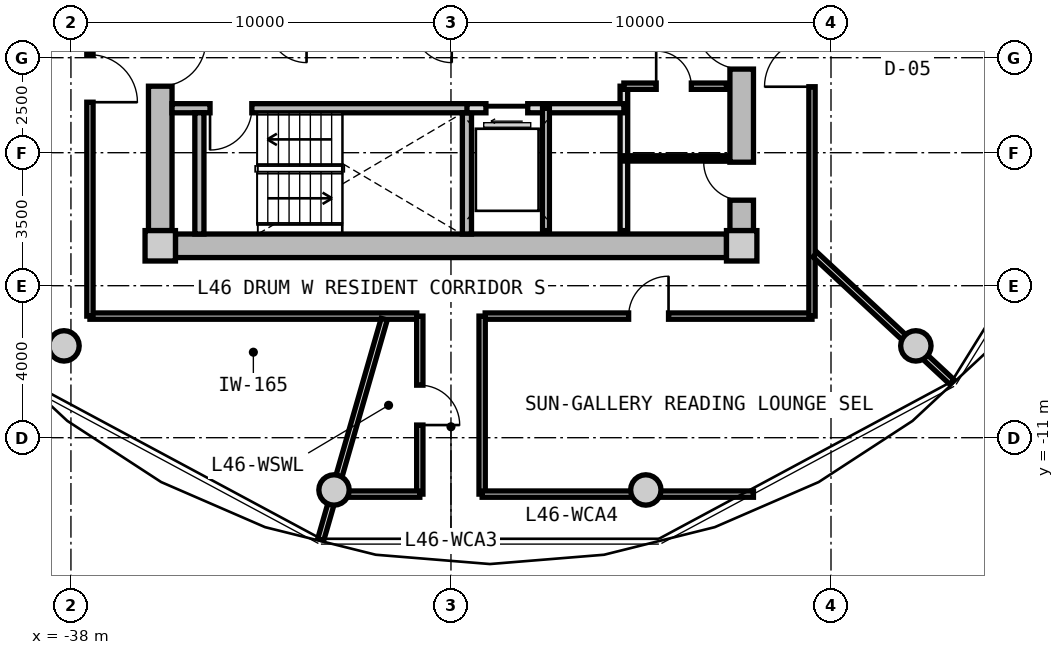
"""IFC4 building model, lengths in metres.
Left out: names, types, materials, properties, quantities, classifications, styles, units other than length and angle.
Written with IfcOpenShell. Run it as: python <this file> out.ifc"""

import sys

from ifc_helpers import new_model, si_unit, direction, frame, frame_2d, origin, origin_2d, place, context, subcontext, project, spatial, rectangle, circle, extrude, source, transform, mapped, element, fill, save


model = new_model("IFC4")
c1 = context("Model", 3, precision=1e-05, world=origin(), true_north=direction((0.0, 1.0)))
c2 = subcontext(c1, "Body", "Model", "MODEL_VIEW")
j1 = project(units=[si_unit("LENGTHUNIT", "METRE"), si_unit("PLANEANGLEUNIT", "RADIAN")], contexts=[c1])
p1 = place(None, origin())
s1 = spatial("IfcSite", under=j1, at=p1, CompositionType="ELEMENT")
p2 = place(p1, origin())
s2 = spatial("IfcBuilding", under=s1, at=p2, CompositionType="ELEMENT")
p3 = place(p2, frame((0.0, 0.0, 149.55)))
s3 = spatial("IfcBuildingStorey", under=s2, at=p3, CompositionType="ELEMENT", Elevation=149.55)
m1 = source(origin(), c2, "Body", "SweptSolid", [
    extrude(rectangle(XDim=0.8, YDim=0.8, at=origin_2d()), origin(), (0.0, 0.0, 1.0), 3.05),
])
for number, where, z_axis, x_axis in (
    (1, (-35.65, -5.95, 0.0), (0.0, 0.0, 1.0), (1.0, 0.0, 0.0)),
    (2, (-20.35, -5.95, 0.0), (0.0, 0.0, 1.0), (1.0, 0.0, 0.0)),
):
    element("IfcColumn", number, at=place(p3, frame(where, z_axis=z_axis, x_axis=x_axis)), inside=s3, PredefinedType="COLUMN", context=c2, shape_type="MappedRepresentation", body=[
        mapped(m1, transform((0.0, 0.0, 0.0), x_axis=(1.0, 0.0, 0.0), y_axis=(0.0, 1.0, 0.0), z_axis=(0.0, 0.0, 1.0), scale=1.0)),
    ])
m2 = source(origin(), c2, "Body", "SweptSolid", [
    extrude(rectangle(XDim=14.5, YDim=0.62, at=frame_2d((7.25, 0.0))), origin(), (0.0, 0.0, 1.0), 2.81),
])
p4 = place(p3, frame((-20.75, -5.95, 0.0), z_axis=(0.0, 0.0, 1.0), x_axis=(-1.0, 0.0, 0.0)))
e3 = element("IfcWall", 3, at=p4, inside=s3, PredefinedType="SHEAR", context=c2, shape_type="MappedRepresentation", body=[
    mapped(m2, transform((0.0, 0.0, 0.0), x_axis=(1.0, 0.0, 0.0), y_axis=(0.0, 1.0, 0.0), z_axis=(0.0, 0.0, 1.0), scale=1.0)),
])
m3 = source(origin(), c2, "Body", "SweptSolid", [
    extrude(rectangle(XDim=11.1, YDim=0.62, at=frame_2d((5.55, 0.0))), origin(), (0.0, 0.0, 1.0), 2.81),
])
p5 = place(p3, frame((-35.65, -5.55, 0.0), z_axis=(0.0, 0.0, 1.0), x_axis=(0.0, 1.0, 0.0)))
e4 = element("IfcWall", 4, at=p5, inside=s3, PredefinedType="SHEAR", context=c2, shape_type="MappedRepresentation", body=[
    mapped(m3, transform((0.0, 0.0, 0.0), x_axis=(1.0, 0.0, 0.0), y_axis=(0.0, 1.0, 0.0), z_axis=(0.0, 0.0, 1.0), scale=1.0)),
])
p6 = place(p5, frame((3.8, 0.0, 0.0)))
e5 = element("IfcOpeningElement", 5, at=p6, cuts=e4, PredefinedType="OPENING", context=c2, shape_type="SweptSolid", body=[
    extrude(rectangle(XDim=1.2, YDim=2.15, at=frame_2d((0.6, 1.075))), frame((0.0, 0.32, 0.0), z_axis=(0.0, -1.0, 0.0), x_axis=(1.0, 0.0, 0.0)), (0.0, 0.0, 1.0), 0.64),
])
p7 = place(p3, frame((-20.35, 5.55, 0.0), z_axis=(0.0, 0.0, 1.0), x_axis=(0.0, -1.0, 0.0)))
e6 = element("IfcWall", 6, at=p7, inside=s3, PredefinedType="SHEAR", context=c2, shape_type="MappedRepresentation", body=[
    mapped(m3, transform((0.0, 0.0, 0.0), x_axis=(1.0, 0.0, 0.0), y_axis=(0.0, 1.0, 0.0), z_axis=(0.0, 0.0, 1.0), scale=1.0)),
])
p8 = place(p7, frame((5.65, 0.0, 0.0)))
e7 = element("IfcOpeningElement", 7, at=p8, cuts=e6, PredefinedType="OPENING", context=c2, shape_type="SweptSolid", body=[
    extrude(rectangle(XDim=1.2, YDim=2.15, at=frame_2d((0.6, 1.075))), frame((0.0, 0.32, 0.0), z_axis=(0.0, -1.0, 0.0), x_axis=(1.0, 0.0, 0.0)), (0.0, 0.0, 1.0), 0.64),
])
p9 = place(p7, frame((9.3, 0.0, 0.0)))
e8 = element("IfcOpeningElement", 8, at=p9, cuts=e6, PredefinedType="OPENING", context=c2, shape_type="SweptSolid", body=[
    extrude(rectangle(XDim=1.0, YDim=2.1, at=frame_2d((0.5, 1.05))), frame((0.0, 0.32, 0.0), z_axis=(0.0, -1.0, 0.0), x_axis=(1.0, 0.0, 0.0)), (0.0, 0.0, 1.0), 0.64),
])
m4 = source(origin(), c2, "Body", "SweptSolid", [
    extrude(circle(Radius=0.4, at=origin_2d()), origin(), (0.0, 0.0, 1.0), 3.05),
])
for number, where, z_axis, x_axis in (
    (9, (-38.183, -8.584, 0.0), (0.0, 0.0, 1.0), (1.0, 0.0, 0.0)),
    (10, (-31.077, -12.375, 0.0), (0.0, 0.0, 1.0), (1.0, 0.0, 0.0)),
    (11, (-22.873, -12.375, 0.0), (0.0, 0.0, 1.0), (1.0, 0.0, 0.0)),
    (12, (-15.767, -8.584, 0.0), (0.0, 0.0, 1.0), (1.0, 0.0, 0.0)),
):
    element("IfcColumn", number, at=place(p3, frame(where, z_axis=z_axis, x_axis=x_axis)), inside=s3, PredefinedType="COLUMN", context=c2, shape_type="MappedRepresentation", body=[
        mapped(m4, transform((0.0, 0.0, 0.0), x_axis=(1.0, 0.0, 0.0), y_axis=(0.0, 1.0, 0.0), z_axis=(0.0, 0.0, 1.0), scale=1.0)),
    ])
m5 = source(origin(), c2, "Body", "SweptSolid", [
    extrude(rectangle(XDim=7.88, YDim=0.24, at=frame_2d((3.94, 0.0))), origin(), (0.0, 0.0, 1.0), 2.81),
])
p10 = place(p3, frame((-35.34, -2.33, 0.0), z_axis=(0.0, 0.0, 1.0), x_axis=(1.0, 0.0, 0.0)))
e13 = element("IfcWall", 13, at=p10, inside=s3, PredefinedType="PARTITIONING", context=c2, shape_type="MappedRepresentation", body=[
    mapped(m5, transform((0.0, 0.0, 0.0), x_axis=(1.0, 0.0, 0.0), y_axis=(0.0, 1.0, 0.0), z_axis=(0.0, 0.0, 1.0), scale=1.0)),
])
p11 = place(p10, frame((1.0, 0.0, 0.0)))
e14 = element("IfcOpeningElement", 14, at=p11, cuts=e13, PredefinedType="OPENING", context=c2, shape_type="SweptSolid", body=[
    extrude(rectangle(XDim=1.1, YDim=2.15, at=frame_2d((0.55, 1.075))), frame((0.0, 0.13, 0.0), z_axis=(0.0, -1.0, 0.0), x_axis=(1.0, 0.0, 0.0)), (0.0, 0.0, 1.0), 0.26),
])
m6 = source(origin(), c2, "Body", "SweptSolid", [
    extrude(rectangle(XDim=3.19, YDim=0.24, at=frame_2d((1.595, 0.0))), origin(), (0.0, 0.0, 1.0), 2.81),
])
for number, where, z_axis, x_axis in (
    (15, (-34.62, -5.64, 0.0), (0.0, 0.0, 1.0), (0.0, 1.0, 0.0)),
    (16, (-27.58, -5.64, 0.0), (0.0, 0.0, 1.0), (0.0, 1.0, 0.0)),
):
    element("IfcWall", number, at=place(p3, frame(where, z_axis=z_axis, x_axis=x_axis)), inside=s3, PredefinedType="PARTITIONING", context=c2, shape_type="MappedRepresentation", body=[
        mapped(m6, transform((0.0, 0.0, 0.0), x_axis=(1.0, 0.0, 0.0), y_axis=(0.0, 1.0, 0.0), z_axis=(0.0, 0.0, 1.0), scale=1.0)),
    ])
m7 = source(origin(), c2, "Body", "SweptSolid", [
    extrude(rectangle(XDim=3.8, YDim=0.2, at=frame_2d((1.9, 0.0))), origin(), (0.0, 0.0, 1.0), 2.795),
])
p12 = place(p3, frame((-23.45, -5.55, 0.0), z_axis=(0.0, 0.0, 1.0), x_axis=(0.0, 1.0, 0.0)))
e17 = element("IfcWall", 17, at=p12, inside=s3, PredefinedType="PARTITIONING", context=c2, shape_type="MappedRepresentation", body=[
    mapped(m7, transform((0.0, 0.0, 0.0), x_axis=(1.0, 0.0, 0.0), y_axis=(0.0, 1.0, 0.0), z_axis=(0.0, 0.0, 1.0), scale=1.0)),
])
m8 = source(origin(), c2, "Body", "SweptSolid", [
    extrude(rectangle(XDim=4.13, YDim=0.24, at=frame_2d((2.065, 0.0))), origin(), (0.0, 0.0, 1.0), 2.795),
])
p13 = place(p3, frame((-27.58, -2.33, 0.0), z_axis=(0.0, 0.0, 1.0), x_axis=(1.0, 0.0, 0.0)))
e18 = element("IfcWall", 18, at=p13, inside=s3, PredefinedType="PARTITIONING", context=c2, shape_type="MappedRepresentation", body=[
    mapped(m8, transform((0.0, 0.0, 0.0), x_axis=(1.0, 0.0, 0.0), y_axis=(0.0, 1.0, 0.0), z_axis=(0.0, 0.0, 1.0), scale=1.0)),
])
p14 = place(p13, frame((0.5, 0.0, 0.0)))
e19 = element("IfcOpeningElement", 19, at=p14, cuts=e18, PredefinedType="OPENING", context=c2, shape_type="SweptSolid", body=[
    extrude(rectangle(XDim=1.1, YDim=2.2, at=frame_2d((0.55, 1.1))), frame((0.0, 0.13, 0.0), z_axis=(0.0, -1.0, 0.0), x_axis=(1.0, 0.0, 0.0)), (0.0, 0.0, 1.0), 0.26),
])
m9 = source(origin(), c2, "Body", "SweptSolid", [
    extrude(rectangle(XDim=3.22, YDim=0.18, at=frame_2d((1.61, 0.0))), origin(), (0.0, 0.0, 1.0), 2.795),
])
p15 = place(p3, frame((-25.5, -5.55, 0.0), z_axis=(0.0, 0.0, 1.0), x_axis=(0.0, 1.0, 0.0)))
e20 = element("IfcWall", 20, at=p15, inside=s3, PredefinedType="PARTITIONING", context=c2, shape_type="MappedRepresentation", body=[
    mapped(m9, transform((0.0, 0.0, 0.0), x_axis=(1.0, 0.0, 0.0), y_axis=(0.0, 1.0, 0.0), z_axis=(0.0, 0.0, 1.0), scale=1.0)),
])
m10 = source(origin(), c2, "Body", "SweptSolid", [
    extrude(rectangle(XDim=2.7, YDim=0.165, at=frame_2d((1.35, 0.0))), origin(), (0.0, 0.0, 1.0), 2.795),
])
p16 = place(p3, frame((-23.45, -1.75, 0.0), z_axis=(0.0, 0.0, 1.0), x_axis=(1.0, 0.0, 0.0)))
e21 = element("IfcWall", 21, at=p16, inside=s3, PredefinedType="PARTITIONING", context=c2, shape_type="MappedRepresentation", body=[
    mapped(m10, transform((0.0, 0.0, 0.0), x_axis=(1.0, 0.0, 0.0), y_axis=(0.0, 1.0, 0.0), z_axis=(0.0, 0.0, 1.0), scale=1.0)),
])
p17 = place(p16, frame((0.85, 0.0, 0.0)))
e22 = element("IfcOpeningElement", 22, at=p17, cuts=e21, PredefinedType="OPENING", context=c2, shape_type="SweptSolid", body=[
    extrude(rectangle(XDim=0.925, YDim=2.1, at=frame_2d((0.462, 1.05))), frame((0.0, 0.093, 0.0), z_axis=(0.0, -1.0, 0.0), x_axis=(1.0, 0.0, 0.0)), (0.0, 0.0, 1.0), 0.185),
])
m11 = source(origin(), c2, "Body", "SweptSolid", [
    extrude(rectangle(XDim=2.7, YDim=0.14, at=frame_2d((1.35, 0.0))), origin(), (0.0, 0.0, 1.0), 2.795),
])
p18 = place(p3, frame((-23.45, -3.65, 0.0), z_axis=(0.0, 0.0, 1.0), x_axis=(1.0, 0.0, 0.0)))
e23 = element("IfcWall", 23, at=p18, inside=s3, PredefinedType="PARTITIONING", context=c2, shape_type="MappedRepresentation", body=[
    mapped(m11, transform((0.0, 0.0, 0.0), x_axis=(1.0, 0.0, 0.0), y_axis=(0.0, 1.0, 0.0), z_axis=(0.0, 0.0, 1.0), scale=1.0)),
])
m12 = source(origin(), c2, "Body", "SweptSolid", [
    extrude(rectangle(XDim=8.6, YDim=0.165, at=frame_2d((4.3, 0.0))), origin(), (0.0, 0.0, 1.0), 2.795),
])
p19 = place(p3, frame((-18.5, -7.8, 0.0), z_axis=(0.0, 0.0, 1.0), x_axis=(-1.0, 0.0, 0.0)))
e24 = element("IfcWall", 24, at=p19, inside=s3, PredefinedType="PARTITIONING", context=c2, shape_type="MappedRepresentation", body=[
    mapped(m12, transform((0.0, 0.0, 0.0), x_axis=(1.0, 0.0, 0.0), y_axis=(0.0, 1.0, 0.0), z_axis=(0.0, 0.0, 1.0), scale=1.0)),
])
p20 = place(p19, frame((3.775, 0.0, 0.0)))
e25 = element("IfcOpeningElement", 25, at=p20, cuts=e24, PredefinedType="OPENING", context=c2, shape_type="SweptSolid", body=[
    extrude(rectangle(XDim=1.05, YDim=2.15, at=frame_2d((0.525, 1.075))), frame((0.0, 0.093, 0.0), z_axis=(0.0, -1.0, 0.0), x_axis=(1.0, 0.0, 0.0)), (0.0, 0.0, 1.0), 0.185),
])
p21 = place(p3, frame((-28.9, -7.8, 0.0), z_axis=(0.0, 0.0, 1.0), x_axis=(-1.0, 0.0, 0.0)))
e26 = element("IfcWall", 26, at=p21, inside=s3, PredefinedType="PARTITIONING", context=c2, shape_type="MappedRepresentation", body=[
    mapped(m12, transform((0.0, 0.0, 0.0), x_axis=(1.0, 0.0, 0.0), y_axis=(0.0, 1.0, 0.0), z_axis=(0.0, 0.0, 1.0), scale=1.0)),
])
m13 = source(origin(), c2, "Body", "SweptSolid", [
    extrude(rectangle(XDim=15.6, YDim=0.165, at=frame_2d((7.8, 0.0))), origin(), (0.0, 0.0, 1.0), 2.795),
])
p22 = place(p3, frame((-37.5, -7.8, 0.0), z_axis=(0.0, 0.0, 1.0), x_axis=(0.0, 1.0, 0.0)))
e27 = element("IfcWall", 27, at=p22, inside=s3, PredefinedType="PARTITIONING", context=c2, shape_type="MappedRepresentation", body=[
    mapped(m13, transform((0.0, 0.0, 0.0), x_axis=(1.0, 0.0, 0.0), y_axis=(0.0, 1.0, 0.0), z_axis=(0.0, 0.0, 1.0), scale=1.0)),
])
p23 = place(p22, frame((13.325, 0.0, 0.0)))
e28 = element("IfcOpeningElement", 28, at=p23, cuts=e27, PredefinedType="OPENING", context=c2, shape_type="SweptSolid", body=[
    extrude(rectangle(XDim=0.92, YDim=2.1, at=frame_2d((0.46, 1.05))), frame((0.0, 0.093, 0.0), z_axis=(0.0, -1.0, 0.0), x_axis=(1.0, 0.0, 0.0)), (0.0, 0.0, 1.0), 0.185),
])
p24 = place(p22, frame((5.628, 0.0, 0.0)))
e29 = element("IfcOpeningElement", 29, at=p24, cuts=e27, PredefinedType="OPENING", context=c2, shape_type="SweptSolid", body=[
    extrude(rectangle(XDim=1.25, YDim=2.2, at=frame_2d((0.625, 1.1))), frame((0.0, 0.093, 0.0), z_axis=(0.0, -1.0, 0.0), x_axis=(1.0, 0.0, 0.0)), (0.0, 0.0, 1.0), 0.185),
])
p25 = place(p3, frame((-18.5, 7.8, 0.0), z_axis=(0.0, 0.0, 1.0), x_axis=(0.0, -1.0, 0.0)))
e30 = element("IfcWall", 30, at=p25, inside=s3, PredefinedType="PARTITIONING", context=c2, shape_type="MappedRepresentation", body=[
    mapped(m13, transform((0.0, 0.0, 0.0), x_axis=(1.0, 0.0, 0.0), y_axis=(0.0, 1.0, 0.0), z_axis=(0.0, 0.0, 1.0), scale=1.0)),
])
p26 = place(p25, frame((8.314, 0.0, 0.0)))
e31 = element("IfcOpeningElement", 31, at=p26, cuts=e30, PredefinedType="OPENING", context=c2, shape_type="SweptSolid", body=[
    extrude(rectangle(XDim=1.25, YDim=2.2, at=frame_2d((0.625, 1.1))), frame((0.0, 0.093, 0.0), z_axis=(0.0, -1.0, 0.0), x_axis=(1.0, 0.0, 0.0)), (0.0, 0.0, 1.0), 0.185),
])
p27 = place(p25, frame((1.515, 0.0, 0.0)))
e32 = element("IfcOpeningElement", 32, at=p27, cuts=e30, PredefinedType="OPENING", context=c2, shape_type="SweptSolid", body=[
    extrude(rectangle(XDim=1.05, YDim=2.15, at=frame_2d((0.525, 1.075))), frame((0.0, 0.093, 0.0), z_axis=(0.0, -1.0, 0.0), x_axis=(1.0, 0.0, 0.0)), (0.0, 0.0, 1.0), 0.185),
])
m14 = source(origin(), c2, "Body", "SweptSolid", [
    extrude(rectangle(XDim=6.035, YDim=0.165, at=frame_2d((3.018, 0.0))), origin(), (0.0, 0.0, 1.0), 2.345),
])
p28 = place(p3, frame((-29.756, -7.88, 0.0), z_axis=(0.0, 0.0, 1.0), x_axis=(-0.276809454862, -0.960924828329, 0.0)))
e33 = element("IfcWall", 33, at=p28, inside=s3, PredefinedType="PARTITIONING", context=c2, shape_type="MappedRepresentation", body=[
    mapped(m14, transform((0.0, 0.0, 0.0), x_axis=(1.0, 0.0, 0.0), y_axis=(0.0, 1.0, 0.0), z_axis=(0.0, 0.0, 1.0), scale=1.0)),
])
m15 = source(origin(), c2, "Body", "SweptSolid", [
    extrude(rectangle(XDim=4.927, YDim=0.165, at=frame_2d((2.463, 0.0))), origin(), (0.0, 0.0, 1.0), 2.345),
])
p29 = place(p3, frame((-18.42, -6.183, 0.0), z_axis=(0.0, 0.0, 1.0), x_axis=(0.732191335987, -0.681098999783, 0.0)))
e34 = element("IfcWall", 34, at=p29, inside=s3, PredefinedType="PARTITIONING", context=c2, shape_type="MappedRepresentation", body=[
    mapped(m15, transform((0.0, 0.0, 0.0), x_axis=(1.0, 0.0, 0.0), y_axis=(0.0, 1.0, 0.0), z_axis=(0.0, 0.0, 1.0), scale=1.0)),
])
m16 = source(origin(), c2, "Body", "SweptSolid", [
    extrude(rectangle(XDim=4.685, YDim=0.165, at=frame_2d((2.342, 0.0))), origin(), (0.0, 0.0, 1.0), 2.795),
])
p30 = place(p3, frame((-28.82, -12.485, 0.0), z_axis=(0.0, 0.0, 1.0), x_axis=(0.0, 1.0, 0.0)))
e35 = element("IfcWall", 35, at=p30, inside=s3, PredefinedType="PARTITIONING", context=c2, shape_type="MappedRepresentation", body=[
    mapped(m16, transform((0.0, 0.0, 0.0), x_axis=(1.0, 0.0, 0.0), y_axis=(0.0, 1.0, 0.0), z_axis=(0.0, 0.0, 1.0), scale=1.0)),
])
p31 = place(p30, frame((1.817, 0.0, 0.0)))
e36 = element("IfcOpeningElement", 36, at=p31, cuts=e35, PredefinedType="OPENING", context=c2, shape_type="SweptSolid", body=[
    extrude(rectangle(XDim=1.05, YDim=2.15, at=frame_2d((0.525, 1.075))), frame((0.0, 0.093, 0.0), z_axis=(0.0, -1.0, 0.0), x_axis=(1.0, 0.0, 0.0)), (0.0, 0.0, 1.0), 0.185),
])
m17 = source(origin(), c2, "Body", "SweptSolid", [
    extrude(rectangle(XDim=2.419, YDim=0.165, at=frame_2d((1.209, 0.0))), origin(), (0.0, 0.0, 1.0), 2.345),
])
p32 = place(p3, frame((-31.239, -12.485, 0.0), z_axis=(0.0, 0.0, 1.0), x_axis=(1.0, 0.0, 0.0)))
e37 = element("IfcWall", 37, at=p32, inside=s3, PredefinedType="PARTITIONING", context=c2, shape_type="MappedRepresentation", body=[
    mapped(m17, transform((0.0, 0.0, 0.0), x_axis=(1.0, 0.0, 0.0), y_axis=(0.0, 1.0, 0.0), z_axis=(0.0, 0.0, 1.0), scale=1.0)),
])
p33 = place(p3, frame((-27.18, -12.485, 0.0), z_axis=(0.0, 0.0, 1.0), x_axis=(0.0, 1.0, 0.0)))
e38 = element("IfcWall", 38, at=p33, inside=s3, PredefinedType="PARTITIONING", context=c2, shape_type="MappedRepresentation", body=[
    mapped(m16, transform((0.0, 0.0, 0.0), x_axis=(1.0, 0.0, 0.0), y_axis=(0.0, 1.0, 0.0), z_axis=(0.0, 0.0, 1.0), scale=1.0)),
])
m18 = source(origin(), c2, "Body", "SweptSolid", [
    extrude(rectangle(XDim=7.139, YDim=0.165, at=frame_2d((3.569, 0.0))), origin(), (0.0, 0.0, 1.0), 2.345),
])
p34 = place(p3, frame((-27.18, -12.485, 0.0), z_axis=(0.0, 0.0, 1.0), x_axis=(1.0, 0.0, 0.0)))
e39 = element("IfcWall", 39, at=p34, inside=s3, PredefinedType="PARTITIONING", context=c2, shape_type="MappedRepresentation", body=[
    mapped(m18, transform((0.0, 0.0, 0.0), x_axis=(1.0, 0.0, 0.0), y_axis=(0.0, 1.0, 0.0), z_axis=(0.0, 0.0, 1.0), scale=1.0)),
])
m19 = source(origin(), c2, "Body", "SweptSolid", [
    extrude(rectangle(XDim=1.1, YDim=2.15, at=frame_2d((0.55, 1.075))), frame((0.0, 0.025, 0.0), z_axis=(0.0, -1.0, 0.0), x_axis=(1.0, 0.0, 0.0)), (0.0, 0.0, 1.0), 0.05),
])
p35 = place(p11, frame((1.1, 0.0, 0.0), z_axis=(0.0, 0.0, 1.0), x_axis=(-1.0, 0.0, 0.0)))
e40 = element("IfcDoor", 40, at=p35, inside=s3, OperationType="SINGLE_SWING_RIGHT", PredefinedType="DOOR", context=c2, shape_type="MappedRepresentation", body=[
    mapped(m19, transform((0.0, 0.0, 0.0), x_axis=(1.0, 0.0, 0.0), y_axis=(0.0, 1.0, 0.0), z_axis=(0.0, 0.0, 1.0), scale=1.0)),
])
fill(e14, e40)
m20 = source(origin(), c2, "Body", "SweptSolid", [
    extrude(rectangle(XDim=1.2, YDim=2.15, at=frame_2d((0.6, 1.075))), frame((0.0, 0.025, 0.0), z_axis=(0.0, -1.0, 0.0), x_axis=(1.0, 0.0, 0.0)), (0.0, 0.0, 1.0), 0.05),
])
p36 = place(p6, frame((1.2, 0.0, 0.0), z_axis=(0.0, 0.0, 1.0), x_axis=(-1.0, 0.0, 0.0)))
e41 = element("IfcDoor", 41, at=p36, inside=s3, OperationType="SINGLE_SWING_LEFT", PredefinedType="DOOR", context=c2, shape_type="MappedRepresentation", body=[
    mapped(m20, transform((0.0, 0.0, 0.0), x_axis=(1.0, 0.0, 0.0), y_axis=(0.0, 1.0, 0.0), z_axis=(0.0, 0.0, 1.0), scale=1.0)),
])
fill(e5, e41)
p37 = place(p8, frame((1.2, 0.0, 0.0), z_axis=(0.0, 0.0, 1.0), x_axis=(-1.0, 0.0, 0.0)))
e42 = element("IfcDoor", 42, at=p37, inside=s3, OperationType="SINGLE_SWING_RIGHT", PredefinedType="DOOR", context=c2, shape_type="MappedRepresentation", body=[
    mapped(m20, transform((0.0, 0.0, 0.0), x_axis=(1.0, 0.0, 0.0), y_axis=(0.0, 1.0, 0.0), z_axis=(0.0, 0.0, 1.0), scale=1.0)),
])
fill(e7, e42)
m21 = source(origin(), c2, "Body", "SweptSolid", [
    extrude(rectangle(XDim=1.1, YDim=2.2, at=frame_2d((0.55, 1.1))), frame((0.0, 0.025, 0.0), z_axis=(0.0, -1.0, 0.0), x_axis=(1.0, 0.0, 0.0)), (0.0, 0.0, 1.0), 0.05),
])
p38 = place(p14, frame((1.1, 0.0, 0.0), z_axis=(0.0, 0.0, 1.0), x_axis=(-1.0, 0.0, 0.0)))
e43 = element("IfcDoor", 43, at=p38, inside=s3, OperationType="SLIDING_TO_LEFT", PredefinedType="DOOR", context=c2, shape_type="MappedRepresentation", body=[
    mapped(m21, transform((0.0, 0.0, 0.0), x_axis=(1.0, 0.0, 0.0), y_axis=(0.0, 1.0, 0.0), z_axis=(0.0, 0.0, 1.0), scale=1.0)),
])
fill(e19, e43)
m22 = source(origin(), c2, "Body", "SweptSolid", [
    extrude(rectangle(XDim=0.925, YDim=2.1, at=frame_2d((0.462, 1.05))), frame((0.0, 0.025, 0.0), z_axis=(0.0, -1.0, 0.0), x_axis=(1.0, 0.0, 0.0)), (0.0, 0.0, 1.0), 0.05),
])
p39 = place(p17, origin())
e44 = element("IfcDoor", 44, at=p39, inside=s3, OperationType="SINGLE_SWING_LEFT", PredefinedType="DOOR", context=c2, shape_type="MappedRepresentation", body=[
    mapped(m22, transform((0.0, 0.0, 0.0), x_axis=(1.0, 0.0, 0.0), y_axis=(0.0, 1.0, 0.0), z_axis=(0.0, 0.0, 1.0), scale=1.0)),
])
fill(e22, e44)
m23 = source(origin(), c2, "Body", "SweptSolid", [
    extrude(rectangle(XDim=1.0, YDim=2.1, at=frame_2d((0.5, 1.05))), frame((0.0, 0.025, 0.0), z_axis=(0.0, -1.0, 0.0), x_axis=(1.0, 0.0, 0.0)), (0.0, 0.0, 1.0), 0.05),
])
p40 = place(p9, frame((1.0, 0.0, 0.0), z_axis=(0.0, 0.0, 1.0), x_axis=(-1.0, 0.0, 0.0)))
e45 = element("IfcDoor", 45, at=p40, inside=s3, OperationType="SINGLE_SWING_RIGHT", PredefinedType="DOOR", context=c2, shape_type="MappedRepresentation", body=[
    mapped(m23, transform((0.0, 0.0, 0.0), x_axis=(1.0, 0.0, 0.0), y_axis=(0.0, 1.0, 0.0), z_axis=(0.0, 0.0, 1.0), scale=1.0)),
])
fill(e8, e45)
m24 = source(origin(), c2, "Body", "SweptSolid", [
    extrude(rectangle(XDim=1.05, YDim=2.15, at=frame_2d((0.525, 1.075))), frame((0.0, 0.025, 0.0), z_axis=(0.0, -1.0, 0.0), x_axis=(1.0, 0.0, 0.0)), (0.0, 0.0, 1.0), 0.05),
])
p41 = place(p31, frame((1.05, 0.0, 0.0), z_axis=(0.0, 0.0, 1.0), x_axis=(-1.0, 0.0, 0.0)))
e46 = element("IfcDoor", 46, at=p41, inside=s3, OperationType="SINGLE_SWING_RIGHT", PredefinedType="DOOR", context=c2, shape_type="MappedRepresentation", body=[
    mapped(m24, transform((0.0, 0.0, 0.0), x_axis=(1.0, 0.0, 0.0), y_axis=(0.0, 1.0, 0.0), z_axis=(0.0, 0.0, 1.0), scale=1.0)),
])
fill(e36, e46)
p42 = place(p20, frame((1.05, 0.0, 0.0), z_axis=(0.0, 0.0, 1.0), x_axis=(-1.0, 0.0, 0.0)))
e47 = element("IfcDoor", 47, at=p42, inside=s3, OperationType="SINGLE_SWING_RIGHT", PredefinedType="DOOR", context=c2, shape_type="MappedRepresentation", body=[
    mapped(m24, transform((0.0, 0.0, 0.0), x_axis=(1.0, 0.0, 0.0), y_axis=(0.0, 1.0, 0.0), z_axis=(0.0, 0.0, 1.0), scale=1.0)),
])
fill(e25, e47)
m25 = source(origin(), c2, "Body", "SweptSolid", [
    extrude(rectangle(XDim=1.25, YDim=2.2, at=frame_2d((0.625, 1.1))), frame((0.0, 0.025, 0.0), z_axis=(0.0, -1.0, 0.0), x_axis=(1.0, 0.0, 0.0)), (0.0, 0.0, 1.0), 0.05),
])
p43 = place(p24, frame((1.25, 0.0, 0.0), z_axis=(0.0, 0.0, 1.0), x_axis=(-1.0, 0.0, 0.0)))
e48 = element("IfcDoor", 48, at=p43, inside=s3, OperationType="SINGLE_SWING_RIGHT", PredefinedType="DOOR", context=c2, shape_type="MappedRepresentation", body=[
    mapped(m25, transform((0.0, 0.0, 0.0), x_axis=(1.0, 0.0, 0.0), y_axis=(0.0, 1.0, 0.0), z_axis=(0.0, 0.0, 1.0), scale=1.0)),
])
fill(e29, e48)
p44 = place(p26, frame((1.25, 0.0, 0.0), z_axis=(0.0, 0.0, 1.0), x_axis=(-1.0, 0.0, 0.0)))
e49 = element("IfcDoor", 49, at=p44, inside=s3, OperationType="SINGLE_SWING_LEFT", PredefinedType="DOOR", context=c2, shape_type="MappedRepresentation", body=[
    mapped(m25, transform((0.0, 0.0, 0.0), x_axis=(1.0, 0.0, 0.0), y_axis=(0.0, 1.0, 0.0), z_axis=(0.0, 0.0, 1.0), scale=1.0)),
])
fill(e31, e49)
save(model, sys.argv[1])
